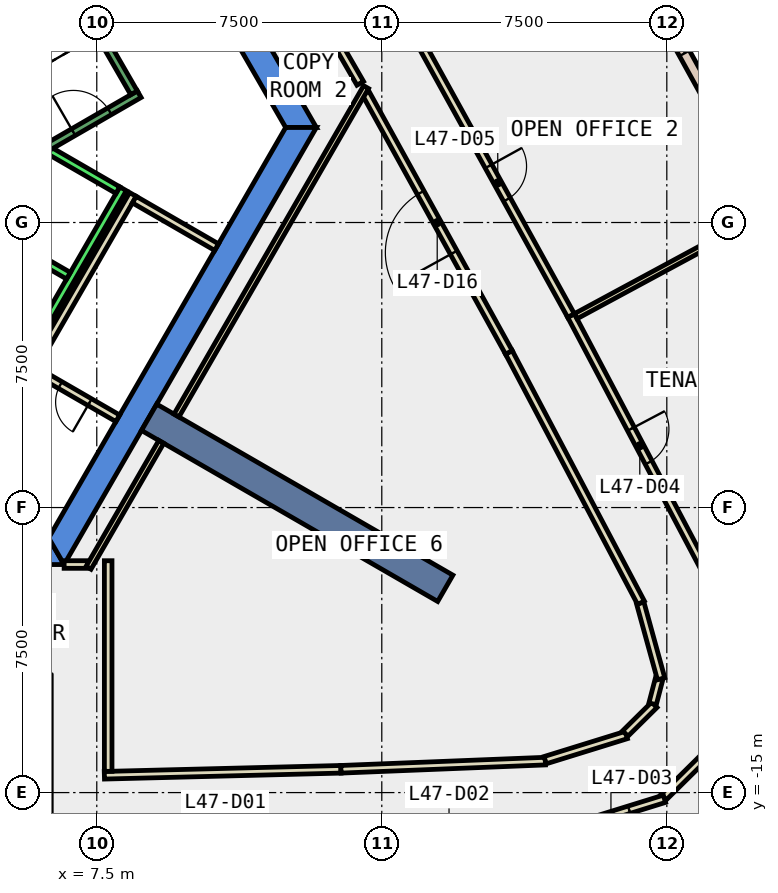
"""IFC4 building model, lengths in metres.
Left out: names, types, materials, properties, quantities, classifications, styles, units other than length and angle.
Written with IfcOpenShell. Run it as: python <this file> out.ifc"""

import sys

from ifc_helpers import new_model, si_unit, direction, frame, frame_2d, origin, place, context, subcontext, project, spatial, polyline, rectangle, outline, extrude, element, fill, save


model = new_model("IFC4")
c1 = context("Model", 3, precision=1e-05, world=origin(), true_north=direction((0.0, 1.0)))
c2 = subcontext(c1, "Body", "Model", "MODEL_VIEW")
j1 = project(units=[si_unit("LENGTHUNIT", "METRE"), si_unit("PLANEANGLEUNIT", "RADIAN")], contexts=[c1])
p1 = place(None, origin())
s1 = spatial("IfcSite", under=j1, at=p1, CompositionType="ELEMENT")
p2 = place(p1, origin())
s2 = spatial("IfcBuilding", under=s1, at=p2, CompositionType="ELEMENT")
p3 = place(p2, frame((0.0, 0.0, 210.8)))
s3 = spatial("IfcBuildingStorey", under=s2, at=p3, CompositionType="ELEMENT", Elevation=210.8)
p4 = place(p3, frame((0.0, 0.0, -0.4)))
e1 = element("IfcWall", 1, at=p4, inside=s3, PredefinedType="SHEAR", context=c2, shape_type="SweptSolid", body=[
    extrude(outline(polyline([(8.084, 11.498), (7.478, 11.148), (12.471, 2.5), (13.279, 2.5), (8.084, 11.498)])), origin(), (0.0, 0.0, 1.0), 4.2),
])
p5 = place(p3, frame((0.0, 0.0, -0.4)))
e2 = element("IfcWall", 2, at=p5, inside=s3, PredefinedType="SHEAR", context=c2, shape_type="SweptSolid", body=[
    extrude(outline(polyline([(5.75, -8.3), (5.75, -9.0), (6.64, -9.0), (6.235, -8.3), (5.75, -8.3)])), origin(), (0.0, 0.0, 1.0), 4.2),
])
p6 = place(p3, frame((0.0, 0.0, -0.4)))
e3 = element("IfcWall", 3, at=p6, inside=s3, PredefinedType="SHEAR", context=c2, shape_type="SweptSolid", body=[
    extrude(outline(polyline([(6.64, -9.0), (13.279, 2.5), (12.471, 2.5), (6.235, -8.3), (6.64, -9.0)])), origin(), (0.0, 0.0, 1.0), 4.2),
])
p7 = place(p3, frame((8.877, -5.125, -0.4), z_axis=(0.0, 0.0, 1.0), x_axis=(0.866017533419, -0.500013631625, 0.0)))
e4 = element("IfcWall", 4, at=p7, inside=s3, PredefinedType="SHEAR", context=c2, shape_type="SweptSolid", body=[
    extrude(rectangle(XDim=9.0, YDim=0.8, at=frame_2d((4.5, 0.0))), origin(), (0.0, 0.0, 1.0), 4.2),
])
p8 = place(p3, frame((25.01, 0.751, 0.0), z_axis=(0.0, 0.0, 1.0), x_axis=(-0.483590905878, 0.875294142419, 0.0)))
e5 = element("IfcWall", 5, at=p8, inside=s3, PredefinedType="STANDARD", context=c2, shape_type="SweptSolid", body=[
    extrude(rectangle(XDim=7.238, YDim=0.3, at=frame_2d((3.619, 0.0))), origin(), (0.0, 0.0, 1.0), 3.8),
])
p9 = place(p8, frame((0.609, 0.0, 0.9)))
e6 = element("IfcOpeningElement", 6, at=p9, cuts=e5, PredefinedType="OPENING", context=c2, shape_type="SweptSolid", body=[
    extrude(rectangle(XDim=2.4, YDim=2.6, at=frame_2d((1.2, 1.3))), frame((0.0, 0.16, 0.0), z_axis=(0.0, -1.0, 0.0), x_axis=(1.0, 0.0, 0.0)), (0.0, 0.0, 1.0), 0.32),
])
p10 = place(p8, frame((4.228, 0.0, 0.9)))
e7 = element("IfcOpeningElement", 7, at=p10, cuts=e5, PredefinedType="OPENING", context=c2, shape_type="SweptSolid", body=[
    extrude(rectangle(XDim=2.4, YDim=2.6, at=frame_2d((1.2, 1.3))), frame((0.0, 0.16, 0.0), z_axis=(0.0, -1.0, 0.0), x_axis=(1.0, 0.0, 0.0)), (0.0, 0.0, 1.0), 0.32),
])
p11 = place(p3, frame((14.433, 3.663, 0.0), z_axis=(0.0, 0.0, 1.0), x_axis=(-0.500149526678, 0.865939057303, 0.0)))
e8 = element("IfcWall", 8, at=p11, inside=s3, PredefinedType="PARTITIONING", context=c2, shape_type="SweptSolid", body=[
    extrude(rectangle(XDim=3.843, YDim=0.2, at=frame_2d((1.921, 0.0))), origin(), (0.0, 0.0, 1.0), 3.8),
])
p12 = place(p11, frame((1.422, 0.0, 0.0)))
e9 = element("IfcOpeningElement", 9, at=p12, cuts=e8, PredefinedType="OPENING", context=c2, shape_type="SweptSolid", body=[
    extrude(rectangle(XDim=1.0, YDim=2.1, at=frame_2d((0.5, 1.05))), frame((0.0, 0.11, 0.0), z_axis=(0.0, -1.0, 0.0), x_axis=(1.0, 0.0, 0.0)), (0.0, 0.0, 1.0), 0.22),
])
p13 = place(p3, frame((7.7, -14.544, 0.0), z_axis=(0.0, 0.0, 1.0), x_axis=(0.99968218628, 0.025209649611, 0.0)))
e10 = element("IfcWall", 10, at=p13, inside=s3, PredefinedType="PARTITIONING", context=c2, shape_type="SweptSolid", body=[
    extrude(rectangle(XDim=6.227, YDim=0.2, at=frame_2d((3.114, 0.0))), origin(), (0.0, 0.0, 1.0), 3.8),
])
p14 = place(p3, frame((13.925, -14.387, 0.0), z_axis=(0.0, 0.0, 1.0), x_axis=(0.999202986342, 0.039917315597, 0.0)))
e11 = element("IfcWall", 11, at=p14, inside=s3, PredefinedType="PARTITIONING", context=c2, shape_type="SweptSolid", body=[
    extrude(rectangle(XDim=5.382, YDim=0.2, at=frame_2d((2.691, 0.0))), origin(), (0.0, 0.0, 1.0), 3.8),
])
p15 = place(p3, frame((19.299, -14.147, 0.0), z_axis=(0.0, 0.0, 1.0), x_axis=(0.955241047187, 0.295828568211, 0.0)))
e12 = element("IfcWall", 12, at=p15, inside=s3, PredefinedType="PARTITIONING", context=c2, shape_type="SweptSolid", body=[
    extrude(rectangle(XDim=2.234, YDim=0.2, at=frame_2d((1.117, 0.0))), origin(), (0.0, 0.0, 1.0), 3.8),
])
p16 = place(p3, frame((21.408, -13.445, 0.0), z_axis=(0.0, 0.0, 1.0), x_axis=(0.711298443117, 0.702890122863, 0.0)))
e13 = element("IfcWall", 13, at=p16, inside=s3, PredefinedType="PARTITIONING", context=c2, shape_type="SweptSolid", body=[
    extrude(rectangle(XDim=1.074, YDim=0.2, at=frame_2d((0.537, 0.0))), origin(), (0.0, 0.0, 1.0), 3.8),
])
p17 = place(p3, frame((22.126, -12.664, 0.0), z_axis=(0.0, 0.0, 1.0), x_axis=(0.253079435581, 0.967445501972, 0.0)))
e14 = element("IfcWall", 14, at=p17, inside=s3, PredefinedType="PARTITIONING", context=c2, shape_type="SweptSolid", body=[
    extrude(rectangle(XDim=0.68, YDim=0.2, at=frame_2d((0.34, 0.0))), origin(), (0.0, 0.0, 1.0), 3.8),
])
p18 = place(p3, frame((22.35, -12.006, 0.0), z_axis=(0.0, 0.0, 1.0), x_axis=(-0.265584627827, 0.964087550725, 0.0)))
e15 = element("IfcWall", 15, at=p18, inside=s3, PredefinedType="PARTITIONING", context=c2, shape_type="SweptSolid", body=[
    extrude(rectangle(XDim=2.067, YDim=0.2, at=frame_2d((1.034, 0.0))), origin(), (0.0, 0.0, 1.0), 3.8),
])
p19 = place(p3, frame((21.821, -10.005, 0.0), z_axis=(0.0, 0.0, 1.0), x_axis=(-0.466770012358, 0.884378739887, 0.0)))
e16 = element("IfcWall", 16, at=p19, inside=s3, PredefinedType="PARTITIONING", context=c2, shape_type="SweptSolid", body=[
    extrude(rectangle(XDim=7.449, YDim=0.2, at=frame_2d((3.725, 0.0))), origin(), (0.0, 0.0, 1.0), 3.8),
])
p20 = place(p3, frame((18.344, -3.417, 0.0), z_axis=(0.0, 0.0, 1.0), x_axis=(-0.483555501116, 0.875313702247, 0.0)))
e17 = element("IfcWall", 17, at=p20, inside=s3, PredefinedType="PARTITIONING", context=c2, shape_type="SweptSolid", body=[
    extrude(rectangle(XDim=7.801, YDim=0.2, at=frame_2d((3.9, 0.0))), origin(), (0.0, 0.0, 1.0), 3.8),
])
p21 = place(p20, frame((3.0, 0.0, 0.0)))
e18 = element("IfcOpeningElement", 18, at=p21, cuts=e17, PredefinedType="OPENING", context=c2, shape_type="SweptSolid", body=[
    extrude(rectangle(XDim=1.8, YDim=2.1, at=frame_2d((0.9, 1.05))), frame((0.0, 0.11, 0.0), z_axis=(0.0, -1.0, 0.0), x_axis=(1.0, 0.0, 0.0)), (0.0, 0.0, 1.0), 0.22),
])
p22 = place(p3, frame((23.878, -13.675, 0.0), z_axis=(0.0, 0.0, 1.0), x_axis=(-0.710949827962, -0.703242733429, 0.0)))
e19 = element("IfcWall", 19, at=p22, inside=s3, PredefinedType="PARTITIONING", context=c2, shape_type="SweptSolid", body=[
    extrude(rectangle(XDim=2.059, YDim=0.2, at=frame_2d((1.03, 0.0))), origin(), (0.0, 0.0, 1.0), 3.8),
])
p23 = place(p3, frame((22.438, -15.163, 0.0), z_axis=(0.0, 0.0, 1.0), x_axis=(-0.955234616163, -0.295849333419, 0.0)))
e20 = element("IfcWall", 20, at=p23, inside=s3, PredefinedType="PARTITIONING", context=c2, shape_type="SweptSolid", body=[
    extrude(rectangle(XDim=2.947, YDim=0.2, at=frame_2d((1.473, 0.0))), origin(), (0.0, 0.0, 1.0), 3.8),
])
p24 = place(p23, frame((0.974, 0.0, 0.0)))
e21 = element("IfcOpeningElement", 21, at=p24, cuts=e20, PredefinedType="OPENING", context=c2, shape_type="SweptSolid", body=[
    extrude(rectangle(XDim=1.0, YDim=2.1, at=frame_2d((0.5, 1.05))), frame((0.0, 0.11, 0.0), z_axis=(0.0, -1.0, 0.0), x_axis=(1.0, 0.0, 0.0)), (0.0, 0.0, 1.0), 0.22),
])
p25 = place(p3, frame((19.98, -2.448, 0.0), z_axis=(0.0, 0.0, 1.0), x_axis=(0.466864023915, -0.884329114738, 0.0)))
e22 = element("IfcWall", 22, at=p25, inside=s3, PredefinedType="PARTITIONING", context=c2, shape_type="SweptSolid", body=[
    extrude(rectangle(XDim=7.75, YDim=0.2, at=frame_2d((3.875, 0.0))), origin(), (0.0, 0.0, 1.0), 3.8),
])
p26 = place(p25, frame((3.375, 0.0, 0.0)))
e23 = element("IfcOpeningElement", 23, at=p26, cuts=e22, PredefinedType="OPENING", context=c2, shape_type="SweptSolid", body=[
    extrude(rectangle(XDim=1.0, YDim=2.1, at=frame_2d((0.5, 1.05))), frame((0.0, 0.11, 0.0), z_axis=(0.0, -1.0, 0.0), x_axis=(1.0, 0.0, 0.0)), (0.0, 0.0, 1.0), 0.22),
])
p27 = place(p3, frame((16.051, 4.663, 0.0), z_axis=(0.0, 0.0, 1.0), x_axis=(0.483513440344, -0.875336936846, 0.0)))
e24 = element("IfcWall", 24, at=p27, inside=s3, PredefinedType="PARTITIONING", context=c2, shape_type="SweptSolid", body=[
    extrude(rectangle(XDim=8.124, YDim=0.2, at=frame_2d((4.062, 0.0))), origin(), (0.0, 0.0, 1.0), 3.8),
])
p28 = place(p27, frame((3.637, 0.0, 0.0)))
e25 = element("IfcOpeningElement", 25, at=p28, cuts=e24, PredefinedType="OPENING", context=c2, shape_type="SweptSolid", body=[
    extrude(rectangle(XDim=1.0, YDim=2.1, at=frame_2d((0.5, 1.05))), frame((0.0, 0.11, 0.0), z_axis=(0.0, -1.0, 0.0), x_axis=(1.0, 0.0, 0.0)), (0.0, 0.0, 1.0), 0.22),
])
p29 = place(p3, frame((8.053, -5.152, 0.0), z_axis=(0.0, 0.0, 1.0), x_axis=(-0.866022959057, 0.500004234368, 0.0)))
e26 = element("IfcWall", 26, at=p29, inside=s3, PredefinedType="PARTITIONING", context=c2, shape_type="SweptSolid", body=[
    extrude(rectangle(XDim=2.5, YDim=0.2, at=frame_2d((1.25, 0.0))), origin(), (0.0, 0.0, 1.0), 3.8),
])
p30 = place(p29, frame((0.85, 0.0, 0.0)))
e27 = element("IfcOpeningElement", 27, at=p30, cuts=e26, PredefinedType="OPENING", context=c2, shape_type="SweptSolid", body=[
    extrude(rectangle(XDim=0.9, YDim=2.1, at=frame_2d((0.45, 1.05))), frame((0.0, 0.11, 0.0), z_axis=(0.0, -1.0, 0.0), x_axis=(1.0, 0.0, 0.0)), (0.0, 0.0, 1.0), 0.22),
])
p31 = place(p3, frame((5.751, -3.938, 0.0), z_axis=(0.0, 0.0, 1.0), x_axis=(0.500034260056, 0.866005622828, 0.0)))
e28 = element("IfcWall", 28, at=p31, inside=s3, PredefinedType="PARTITIONING", context=c2, shape_type="SweptSolid", body=[
    extrude(rectangle(XDim=5.399, YDim=0.2, at=frame_2d((2.7, 0.0))), origin(), (0.0, 0.0, 1.0), 3.8),
])
p32 = place(p3, frame((8.488, 0.602, 0.0), z_axis=(0.0, 0.0, 1.0), x_axis=(0.866022959057, -0.500004234368, 0.0)))
e29 = element("IfcWall", 29, at=p32, inside=s3, PredefinedType="PARTITIONING", context=c2, shape_type="SweptSolid", body=[
    extrude(rectangle(XDim=2.5, YDim=0.2, at=frame_2d((1.25, 0.0))), origin(), (0.0, 0.0, 1.0), 3.8),
])
p33 = place(p3, frame((6.641, -8.999, 0.0), z_axis=(0.0, 0.0, 1.0), x_axis=(1.0, 0.0, 0.0)))
e30 = element("IfcWall", 30, at=p33, inside=s3, PredefinedType="PARTITIONING", context=c2, shape_type="SweptSolid", body=[
    extrude(rectangle(XDim=0.617, YDim=0.2, at=frame_2d((0.309, 0.0))), origin(), (0.0, 0.0, 1.0), 3.8),
])
p34 = place(p3, frame((7.283, -9.086, 0.0), z_axis=(0.0, 0.0, 1.0), x_axis=(0.500035303972, 0.866005020067, 0.0)))
e31 = element("IfcWall", 31, at=p34, inside=s3, PredefinedType="PARTITIONING", context=c2, shape_type="SweptSolid", body=[
    extrude(rectangle(XDim=3.828, YDim=0.15, at=frame_2d((1.914, 0.0))), origin(), (0.0, 0.0, 1.0), 3.8),
])
p35 = place(p3, frame((7.8, -8.899, 0.0), z_axis=(0.0, 0.0, 1.0), x_axis=(0.0, -1.0, 0.0)))
e32 = element("IfcWall", 32, at=p35, inside=s3, PredefinedType="PARTITIONING", context=c2, shape_type="SweptSolid", body=[
    extrude(rectangle(XDim=5.542, YDim=0.2, at=frame_2d((2.771, 0.0))), origin(), (0.0, 0.0, 1.0), 3.8),
])
p36 = place(p3, frame((20.103, -2.466, 0.0), z_axis=(0.0, 0.0, 1.0), x_axis=(0.879965969606, 0.475036727354, 0.0)))
e33 = element("IfcWall", 33, at=p36, inside=s3, PredefinedType="PARTITIONING", context=c2, shape_type="SweptSolid", body=[
    extrude(rectangle(XDim=4.381, YDim=0.15, at=frame_2d((2.19, 0.0))), origin(), (0.0, 0.0, 1.0), 3.8),
])
p37 = place(p3, frame((9.597, -5.079, 0.0), z_axis=(0.0, 0.0, 1.0), x_axis=(0.499962477963, 0.866047066059, 0.0)))
e34 = element("IfcWall", 34, at=p37, inside=s3, PredefinedType="PARTITIONING", context=c2, shape_type="SweptSolid", body=[
    extrude(rectangle(XDim=9.979, YDim=0.15, at=frame_2d((4.989, 0.0))), origin(), (0.0, 0.0, 1.0), 3.8),
])
p38 = place(p3, frame((5.492, -3.788, 0.0), z_axis=(0.0, 0.0, 1.0), x_axis=(0.500034260056, 0.866005622828, 0.0)))
e35 = element("IfcWall", 35, at=p38, inside=s3, PredefinedType="STANDARD", context=c2, shape_type="SweptSolid", body=[
    extrude(rectangle(XDim=5.399, YDim=0.2, at=frame_2d((2.7, 0.0))), origin(), (0.0, 0.0, 1.0), 3.8),
])
for number, where, z_axis, x_axis in (
    (36, (4.677, -0.2, 0.0), (0.0, 0.0, 1.0), (0.866, -0.5, 0.0)),
    (37, (5.977, 2.052, 0.0), (0.0, 0.0, 1.0), (0.866, -0.5, 0.0)),
):
    element("IfcWall", number, at=place(p3, frame(where, z_axis=z_axis, x_axis=x_axis)), inside=s3, PredefinedType="STANDARD", context=c2, shape_type="SweptSolid", body=[
        extrude(rectangle(XDim=2.399, YDim=0.2, at=frame_2d((1.2, 0.0))), origin(), (0.0, 0.0, 1.0), 3.8),
    ])
p39 = place(p3, frame((4.806, 1.176, 0.0), z_axis=(0.0, 0.0, 1.0), x_axis=(0.866059941101, 0.499940174841, 0.0)))
e38 = element("IfcWall", 38, at=p39, inside=s3, PredefinedType="STANDARD", context=c2, shape_type="SweptSolid", body=[
    extrude(rectangle(XDim=4.4, YDim=0.2, at=frame_2d((2.2, 0.0))), origin(), (0.0, 0.0, 1.0), 3.8),
])
p40 = place(p39, frame((2.4, 0.0, 0.0)))
e39 = element("IfcOpeningElement", 39, at=p40, cuts=e38, PredefinedType="OPENING", context=c2, shape_type="SweptSolid", body=[
    extrude(rectangle(XDim=1.1, YDim=2.2, at=frame_2d((0.55, 1.1))), frame((0.0, 0.11, 0.0), z_axis=(0.0, -1.0, 0.0), x_axis=(1.0, 0.0, 0.0)), (0.0, 0.0, 1.0), 0.22),
])
p41 = place(p3, frame((8.48, 3.412, 0.0), z_axis=(0.0, 0.0, 1.0), x_axis=(-0.499978703459, 0.866037698999, 0.0)))
e40 = element("IfcWall", 40, at=p41, inside=s3, PredefinedType="STANDARD", context=c2, shape_type="SweptSolid", body=[
    extrude(rectangle(XDim=6.9, YDim=0.2, at=frame_2d((3.45, 0.0))), origin(), (0.0, 0.0, 1.0), 3.8),
])
p42 = place(p10, origin())
e41 = element("IfcWindow", 41, at=p42, inside=s3, PartitioningType="SINGLE_PANEL", PredefinedType="WINDOW", context=c2, shape_type="SweptSolid", body=[
    extrude(rectangle(XDim=2.4, YDim=2.6, at=frame_2d((1.2, 1.3))), frame((0.0, 0.03, 0.0), z_axis=(0.0, -1.0, 0.0), x_axis=(1.0, 0.0, 0.0)), (0.0, 0.0, 1.0), 0.06),
])
fill(e7, e41)
p43 = place(p24, origin())
e42 = element("IfcDoor", 42, at=p43, inside=s3, OperationType="SINGLE_SWING_LEFT", PredefinedType="DOOR", context=c2, shape_type="SweptSolid", body=[
    extrude(rectangle(XDim=1.0, YDim=2.1, at=frame_2d((0.5, 1.05))), frame((0.0, 0.025, 0.0), z_axis=(0.0, -1.0, 0.0), x_axis=(1.0, 0.0, 0.0)), (0.0, 0.0, 1.0), 0.05),
])
fill(e21, e42)
p44 = place(p26, origin())
e43 = element("IfcDoor", 43, at=p44, inside=s3, OperationType="SINGLE_SWING_LEFT", PredefinedType="DOOR", context=c2, shape_type="SweptSolid", body=[
    extrude(rectangle(XDim=1.0, YDim=2.1, at=frame_2d((0.5, 1.05))), frame((0.0, 0.025, 0.0), z_axis=(0.0, -1.0, 0.0), x_axis=(1.0, 0.0, 0.0)), (0.0, 0.0, 1.0), 0.05),
])
fill(e23, e43)
p45 = place(p28, origin())
e44 = element("IfcDoor", 44, at=p45, inside=s3, OperationType="SINGLE_SWING_RIGHT", PredefinedType="DOOR", context=c2, shape_type="SweptSolid", body=[
    extrude(rectangle(XDim=1.0, YDim=2.1, at=frame_2d((0.5, 1.05))), frame((0.0, 0.025, 0.0), z_axis=(0.0, -1.0, 0.0), x_axis=(1.0, 0.0, 0.0)), (0.0, 0.0, 1.0), 0.05),
])
fill(e25, e44)
p46 = place(p21, origin())
e45 = element("IfcDoor", 45, at=p46, inside=s3, OperationType="DOUBLE_DOOR_SINGLE_SWING", PredefinedType="DOOR", context=c2, shape_type="SweptSolid", body=[
    extrude(rectangle(XDim=1.8, YDim=2.1, at=frame_2d((0.9, 1.05))), frame((0.0, 0.025, 0.0), z_axis=(0.0, -1.0, 0.0), x_axis=(1.0, 0.0, 0.0)), (0.0, 0.0, 1.0), 0.05),
])
fill(e18, e45)
p47 = place(p30, origin())
e46 = element("IfcDoor", 46, at=p47, inside=s3, OperationType="SINGLE_SWING_LEFT", PredefinedType="DOOR", context=c2, shape_type="SweptSolid", body=[
    extrude(rectangle(XDim=0.9, YDim=2.1, at=frame_2d((0.45, 1.05))), frame((0.0, 0.025, 0.0), z_axis=(0.0, -1.0, 0.0), x_axis=(1.0, 0.0, 0.0)), (0.0, 0.0, 1.0), 0.05),
])
fill(e27, e46)
p48 = place(p40, origin())
e47 = element("IfcDoor", 47, at=p48, inside=s3, OperationType="SINGLE_SWING_LEFT", PredefinedType="DOOR", context=c2, shape_type="SweptSolid", body=[
    extrude(rectangle(XDim=1.1, YDim=2.2, at=frame_2d((0.55, 1.1))), frame((0.0, 0.025, 0.0), z_axis=(0.0, -1.0, 0.0), x_axis=(1.0, 0.0, 0.0)), (0.0, 0.0, 1.0), 0.05),
])
fill(e39, e47)
save(model, sys.argv[1])
